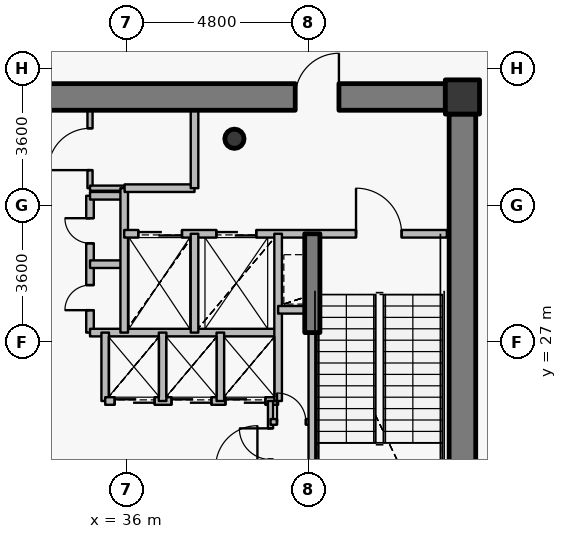
"""IFC4 building model, lengths in metres.
Left out: names, types, materials, properties, quantities, classifications, styles, units other than length and angle.
Written with IfcOpenShell. Run it as: python <this file> out.ifc"""

import sys

from ifc_helpers import new_model, si_unit, direction, frame, frame_2d, origin, origin_2d, place, context, subcontext, project, spatial, rectangle, hollow_circle, extrude, source, transform, mapped, element, fill, save


model = new_model("IFC4")
c1 = context("Model", 3, precision=1e-05, world=origin(), true_north=direction((0.0, 1.0)))
c2 = subcontext(c1, "Body", "Model", "MODEL_VIEW")
j1 = project(units=[si_unit("LENGTHUNIT", "METRE"), si_unit("PLANEANGLEUNIT", "RADIAN")], contexts=[c1])
p1 = place(None, origin())
s1 = spatial("IfcSite", under=j1, at=p1, CompositionType="ELEMENT")
p2 = place(p1, origin())
s2 = spatial("IfcBuilding", under=s1, at=p2, CompositionType="ELEMENT")
p3 = place(p2, frame((0.0, 0.0, 355.2)))
s3 = spatial("IfcBuildingStorey", under=s2, at=p3, CompositionType="ELEMENT", Elevation=355.2)
p4 = place(p3, frame((44.85, 33.45, 0.0), z_axis=(0.0, 0.0, 1.0), x_axis=(1.0, 0.0, 0.0)))
e1 = element("IfcColumn", 1, at=p4, inside=s3, PredefinedType="COLUMN", context=c2, shape_type="SweptSolid", body=[
    extrude(rectangle(XDim=0.9, YDim=0.9, at=origin_2d()), origin(), (0.0, 0.0, 1.0), 4.2),
])
p5 = place(p3, frame((38.85, 32.35, 0.0), z_axis=(0.0, 0.0, 1.0), x_axis=(1.0, 0.0, 0.0)))
e2 = element("IfcColumn", 2, at=p5, inside=s3, PredefinedType="COLUMN", context=c2, shape_type="SweptSolid", body=[
    extrude(hollow_circle(Radius=0.254, WallThickness=0.02, at=origin_2d()), origin(), (0.0, 0.0, 1.0), 4.2),
])
p6 = place(p3, frame((27.6, 33.45, 0.0), z_axis=(0.0, 0.0, 1.0), x_axis=(1.0, 0.0, 0.0)))
e3 = element("IfcWall", 3, at=p6, inside=s3, PredefinedType="SHEAR", context=c2, shape_type="SweptSolid", body=[
    extrude(rectangle(XDim=16.8, YDim=0.7, at=frame_2d((8.4, 0.0))), origin(), (0.0, 0.0, 1.0), 3.5),
])
p7 = place(p6, frame((12.85, 0.0, 0.0)))
e4 = element("IfcOpeningElement", 4, at=p7, cuts=e3, PredefinedType="OPENING", context=c2, shape_type="SweptSolid", body=[
    extrude(rectangle(XDim=1.15, YDim=2.15, at=origin_2d()), frame((0.575, 0.36, 1.075), z_axis=(0.0, -1.0, 0.0), x_axis=(1.0, 0.0, 0.0)), (0.0, 0.0, 1.0), 0.72),
])
p8 = place(p3, frame((44.85, 33.0, 0.0), z_axis=(0.0, 0.0, 1.0), x_axis=(0.0, -1.0, 0.0)))
e5 = element("IfcWall", 5, at=p8, inside=s3, PredefinedType="SHEAR", context=c2, shape_type="SweptSolid", body=[
    extrude(rectangle(XDim=12.0, YDim=0.7, at=frame_2d((6.0, 0.0))), origin(), (0.0, 0.0, 1.0), 3.5),
])
p9 = place(p3, frame((40.9, 27.25, 0.0), z_axis=(0.0, 0.0, 1.0), x_axis=(0.0, 1.0, 0.0)))
e6 = element("IfcWall", 6, at=p9, inside=s3, PredefinedType="SHEAR", context=c2, shape_type="SweptSolid", body=[
    extrude(rectangle(XDim=2.6, YDim=0.4, at=frame_2d((1.3, 0.0))), origin(), (0.0, 0.0, 1.0), 3.55),
])
p10 = place(p3, frame((35.05, 27.25, 0.0), z_axis=(0.0, 0.0, 1.0), x_axis=(0.0, 1.0, 0.0)))
e7 = element("IfcWall", 7, at=p10, inside=s3, PredefinedType="PARTITIONING", context=c2, shape_type="SweptSolid", body=[
    extrude(rectangle(XDim=3.6, YDim=0.2, at=frame_2d((1.8, 0.0))), origin(), (0.0, 0.0, 1.0), 3.95),
])
p11 = place(p10, frame((0.59, 0.0, 0.0)))
e8 = element("IfcOpeningElement", 8, at=p11, cuts=e7, PredefinedType="OPENING", context=c2, shape_type="SweptSolid", body=[
    extrude(rectangle(XDim=0.66, YDim=2.05, at=origin_2d()), frame((0.33, 0.11, 1.025), z_axis=(0.0, -1.0, 0.0), x_axis=(1.0, 0.0, 0.0)), (0.0, 0.0, 1.0), 0.22),
])
p12 = place(p10, frame((2.35, 0.0, 0.0)))
e9 = element("IfcOpeningElement", 9, at=p12, cuts=e7, PredefinedType="OPENING", context=c2, shape_type="SweptSolid", body=[
    extrude(rectangle(XDim=0.66, YDim=2.05, at=origin_2d()), frame((0.33, 0.11, 1.025), z_axis=(0.0, -1.0, 0.0), x_axis=(1.0, 0.0, 0.0)), (0.0, 0.0, 1.0), 0.22),
])
p13 = place(p3, frame((35.05, 27.25, 0.0), z_axis=(0.0, 0.0, 1.0), x_axis=(1.0, 0.0, 0.0)))
e10 = element("IfcWall", 10, at=p13, inside=s3, PredefinedType="PARTITIONING", context=c2, shape_type="SweptSolid", body=[
    extrude(rectangle(XDim=4.95, YDim=0.2, at=frame_2d((2.475, 0.0))), origin(), (0.0, 0.0, 1.0), 3.535),
])
for number, where, z_axis, x_axis in (
    (11, (35.05, 29.05, 0.0), (0.0, 0.0, 1.0), (1.0, 0.0, 0.0)),
    (12, (35.05, 30.85, 0.0), (0.0, 0.0, 1.0), (1.0, 0.0, 0.0)),
):
    element("IfcWall", number, at=place(p3, frame(where, z_axis=z_axis, x_axis=x_axis)), inside=s3, PredefinedType="PARTITIONING", context=c2, shape_type="SweptSolid", body=[
        extrude(rectangle(XDim=0.9, YDim=0.2, at=frame_2d((0.45, 0.0))), origin(), (0.0, 0.0, 1.0), 3.95),
    ])
p14 = place(p3, frame((35.05, 31.05, 0.0), z_axis=(0.0, 0.0, 1.0), x_axis=(0.0, 1.0, 0.0)))
e13 = element("IfcWall", 13, at=p14, inside=s3, PredefinedType="PARTITIONING", context=c2, shape_type="SweptSolid", body=[
    extrude(rectangle(XDim=2.05, YDim=0.135, at=frame_2d((1.025, 0.0))), origin(), (0.0, 0.0, 1.0), 3.535),
])
p15 = place(p14, frame((0.475, 0.0, 0.0)))
e14 = element("IfcOpeningElement", 14, at=p15, cuts=e13, PredefinedType="OPENING", context=c2, shape_type="SweptSolid", body=[
    extrude(rectangle(XDim=1.1, YDim=2.15, at=origin_2d()), frame((0.55, 0.078, 1.075), z_axis=(0.0, -1.0, 0.0), x_axis=(1.0, 0.0, 0.0)), (0.0, 0.0, 1.0), 0.155),
])
p16 = place(p3, frame((35.05, 31.05, 0.0), z_axis=(0.0, 0.0, 1.0), x_axis=(1.0, 0.0, 0.0)))
e15 = element("IfcWall", 15, at=p16, inside=s3, PredefinedType="PARTITIONING", context=c2, shape_type="SweptSolid", body=[
    extrude(rectangle(XDim=0.9, YDim=0.135, at=frame_2d((0.45, 0.0))), origin(), (0.0, 0.0, 1.0), 3.95),
])
p17 = place(p3, frame((35.45, 25.45, 0.0), z_axis=(0.0, 0.0, 1.0), x_axis=(0.0, 1.0, 0.0)))
e16 = element("IfcWall", 16, at=p17, inside=s3, PredefinedType="PARTITIONING", context=c2, shape_type="SweptSolid", body=[
    extrude(rectangle(XDim=1.8, YDim=0.2, at=frame_2d((0.9, 0.0))), origin(), (0.0, 0.0, 1.0), 3.95),
])
p18 = place(p3, frame((35.45, 25.45, 0.0), z_axis=(0.0, 0.0, 1.0), x_axis=(1.0, 0.0, 0.0)))
e17 = element("IfcWall", 17, at=p18, inside=s3, PredefinedType="PARTITIONING", context=c2, shape_type="SweptSolid", body=[
    extrude(rectangle(XDim=4.55, YDim=0.2, at=frame_2d((2.275, 0.0))), origin(), (0.0, 0.0, 1.0), 3.535),
])
p19 = place(p18, frame((0.25, 0.0, 0.0)))
e18 = element("IfcOpeningElement", 18, at=p19, cuts=e17, PredefinedType="OPENING", context=c2, shape_type="SweptSolid", body=[
    extrude(rectangle(XDim=1.05, YDim=2.15, at=origin_2d()), frame((0.525, 0.11, 1.075), z_axis=(0.0, -1.0, 0.0), x_axis=(1.0, 0.0, 0.0)), (0.0, 0.0, 1.0), 0.22),
])
p20 = place(p18, frame((1.745, 0.0, 0.0)))
e19 = element("IfcOpeningElement", 19, at=p20, cuts=e17, PredefinedType="OPENING", context=c2, shape_type="SweptSolid", body=[
    extrude(rectangle(XDim=1.05, YDim=2.15, at=origin_2d()), frame((0.525, 0.11, 1.075), z_axis=(0.0, -1.0, 0.0), x_axis=(1.0, 0.0, 0.0)), (0.0, 0.0, 1.0), 0.22),
])
p21 = place(p18, frame((3.165, 0.0, 0.0)))
e20 = element("IfcOpeningElement", 20, at=p21, cuts=e17, PredefinedType="OPENING", context=c2, shape_type="SweptSolid", body=[
    extrude(rectangle(XDim=1.05, YDim=2.15, at=origin_2d()), frame((0.525, 0.11, 1.075), z_axis=(0.0, -1.0, 0.0), x_axis=(1.0, 0.0, 0.0)), (0.0, 0.0, 1.0), 0.22),
])
p22 = place(p3, frame((35.95, 27.25, 0.0), z_axis=(0.0, 0.0, 1.0), x_axis=(0.0, 1.0, 0.0)))
e21 = element("IfcWall", 21, at=p22, inside=s3, PredefinedType="PARTITIONING", context=c2, shape_type="SweptSolid", body=[
    extrude(rectangle(XDim=3.8, YDim=0.2, at=frame_2d((1.9, 0.0))), origin(), (0.0, 0.0, 1.0), 3.95),
])
p23 = place(p3, frame((35.95, 29.85, 0.0), z_axis=(0.0, 0.0, 1.0), x_axis=(1.0, 0.0, 0.0)))
e22 = element("IfcWall", 22, at=p23, inside=s3, PredefinedType="PARTITIONING", context=c2, shape_type="SweptSolid", body=[
    extrude(rectangle(XDim=8.49, YDim=0.2, at=frame_2d((4.245, 0.0))), origin(), (0.0, 0.0, 1.0), 3.535),
])
p24 = place(p23, frame((6.1, 0.0, 0.0)))
e23 = element("IfcOpeningElement", 23, at=p24, cuts=e22, PredefinedType="OPENING", context=c2, shape_type="SweptSolid", body=[
    extrude(rectangle(XDim=1.2, YDim=2.15, at=origin_2d()), frame((0.6, 0.11, 1.075), z_axis=(0.0, -1.0, 0.0), x_axis=(1.0, 0.0, 0.0)), (0.0, 0.0, 1.0), 0.22),
])
p25 = place(p23, frame((0.37, 0.0, 0.0)))
e24 = element("IfcOpeningElement", 24, at=p25, cuts=e22, PredefinedType="OPENING", context=c2, shape_type="SweptSolid", body=[
    extrude(rectangle(XDim=1.15, YDim=2.15, at=origin_2d()), frame((0.575, 0.11, 1.075), z_axis=(0.0, -1.0, 0.0), x_axis=(1.0, 0.0, 0.0)), (0.0, 0.0, 1.0), 0.22),
])
p26 = place(p23, frame((2.425, 0.0, 0.0)))
e25 = element("IfcOpeningElement", 25, at=p26, cuts=e22, PredefinedType="OPENING", context=c2, shape_type="SweptSolid", body=[
    extrude(rectangle(XDim=1.05, YDim=2.15, at=origin_2d()), frame((0.525, 0.11, 1.075), z_axis=(0.0, -1.0, 0.0), x_axis=(1.0, 0.0, 0.0)), (0.0, 0.0, 1.0), 0.22),
])
p27 = place(p3, frame((35.96, 31.05, 0.0), z_axis=(0.0, 0.0, 1.0), x_axis=(1.0, 0.0, 0.0)))
e26 = element("IfcWall", 26, at=p27, inside=s3, PredefinedType="PARTITIONING", context=c2, shape_type="SweptSolid", body=[
    extrude(rectangle(XDim=1.84, YDim=0.2, at=frame_2d((0.92, 0.0))), origin(), (0.0, 0.0, 1.0), 3.95),
])
p28 = place(p3, frame((36.96, 25.45, 0.0), z_axis=(0.0, 0.0, 1.0), x_axis=(0.0, 1.0, 0.0)))
e27 = element("IfcWall", 27, at=p28, inside=s3, PredefinedType="PARTITIONING", context=c2, shape_type="SweptSolid", body=[
    extrude(rectangle(XDim=1.8, YDim=0.2, at=frame_2d((0.9, 0.0))), origin(), (0.0, 0.0, 1.0), 3.95),
])
p29 = place(p3, frame((37.8, 27.25, 0.0), z_axis=(0.0, 0.0, 1.0), x_axis=(0.0, 1.0, 0.0)))
e28 = element("IfcWall", 28, at=p29, inside=s3, PredefinedType="PARTITIONING", context=c2, shape_type="SweptSolid", body=[
    extrude(rectangle(XDim=2.6, YDim=0.2, at=frame_2d((1.3, 0.0))), origin(), (0.0, 0.0, 1.0), 3.95),
])
p30 = place(p3, frame((37.8, 31.05, 0.0), z_axis=(0.0, 0.0, 1.0), x_axis=(0.0, 1.0, 0.0)))
e29 = element("IfcWall", 29, at=p30, inside=s3, PredefinedType="PARTITIONING", context=c2, shape_type="SweptSolid", body=[
    extrude(rectangle(XDim=2.05, YDim=0.2, at=frame_2d((1.025, 0.0))), origin(), (0.0, 0.0, 1.0), 3.535),
])
p31 = place(p3, frame((38.48, 25.45, 0.0), z_axis=(0.0, 0.0, 1.0), x_axis=(0.0, 1.0, 0.0)))
e30 = element("IfcWall", 30, at=p31, inside=s3, PredefinedType="PARTITIONING", context=c2, shape_type="SweptSolid", body=[
    extrude(rectangle(XDim=1.8, YDim=0.2, at=frame_2d((0.9, 0.0))), origin(), (0.0, 0.0, 1.0), 3.95),
])
p32 = place(p3, frame((39.8, 23.7, 0.0), z_axis=(0.0, 0.0, 1.0), x_axis=(0.0, 1.0, 0.0)))
e31 = element("IfcWall", 31, at=p32, inside=s3, PredefinedType="PARTITIONING", context=c2, shape_type="SweptSolid", body=[
    extrude(rectangle(XDim=1.75, YDim=0.135, at=frame_2d((0.875, 0.0))), origin(), (0.0, 0.0, 1.0), 3.95),
])
p33 = place(p32, frame((0.21, 0.0, 0.0)))
e32 = element("IfcOpeningElement", 32, at=p33, cuts=e31, PredefinedType="OPENING", context=c2, shape_type="SweptSolid", body=[
    extrude(rectangle(XDim=0.82, YDim=2.1, at=origin_2d()), frame((0.41, 0.078, 1.05), z_axis=(0.0, -1.0, 0.0), x_axis=(1.0, 0.0, 0.0)), (0.0, 0.0, 1.0), 0.155),
])
p34 = place(p3, frame((39.8, 24.9, 0.0), z_axis=(0.0, 0.0, 1.0), x_axis=(1.0, 0.0, 0.0)))
e33 = element("IfcWall", 33, at=p34, inside=s3, PredefinedType="PARTITIONING", context=c2, shape_type="SweptSolid", body=[
    extrude(rectangle(XDim=1.1, YDim=0.15, at=frame_2d((0.55, 0.0))), origin(), (0.0, 0.0, 1.0), 3.95),
])
p35 = place(p34, frame((0.17, 0.0, 0.0)))
e34 = element("IfcOpeningElement", 34, at=p35, cuts=e33, PredefinedType="OPENING", context=c2, shape_type="SweptSolid", body=[
    extrude(rectangle(XDim=0.76, YDim=2.1, at=origin_2d()), frame((0.38, 0.085, 1.05), z_axis=(0.0, -1.0, 0.0), x_axis=(1.0, 0.0, 0.0)), (0.0, 0.0, 1.0), 0.17),
])
p36 = place(p3, frame((40.0, 25.45, 0.0), z_axis=(0.0, 0.0, 1.0), x_axis=(0.0, 1.0, 0.0)))
e35 = element("IfcWall", 35, at=p36, inside=s3, PredefinedType="PARTITIONING", context=c2, shape_type="SweptSolid", body=[
    extrude(rectangle(XDim=4.4, YDim=0.2, at=frame_2d((2.2, 0.0))), origin(), (0.0, 0.0, 1.0), 3.95),
])
p37 = place(p3, frame((40.0, 27.85, 0.0), z_axis=(0.0, 0.0, 1.0), x_axis=(1.0, 0.0, 0.0)))
e36 = element("IfcWall", 36, at=p37, inside=s3, PredefinedType="PARTITIONING", context=c2, shape_type="SweptSolid", body=[
    extrude(rectangle(XDim=0.9, YDim=0.2, at=frame_2d((0.45, 0.0))), origin(), (0.0, 0.0, 1.0), 3.95),
])
p38 = place(p3, frame((40.9, 21.33, 0.0), z_axis=(0.0, 0.0, 1.0), x_axis=(0.0, 1.0, 0.0)))
e37 = element("IfcWall", 37, at=p38, inside=s3, PredefinedType="PARTITIONING", context=c2, shape_type="SweptSolid", body=[
    extrude(rectangle(XDim=5.91, YDim=0.2, at=frame_2d((2.955, 0.0))), origin(), (0.0, 0.0, 1.0), 3.485),
])
p39 = place(p3, frame((45.2, 33.8, 0.0), z_axis=(0.0, 0.0, 1.0), x_axis=(-1.0, 0.0, 0.0)))
e38 = element("IfcWall", 38, at=p39, inside=s3, PredefinedType="PARTITIONING", context=c2, shape_type="SweptSolid", body=[
    extrude(rectangle(XDim=0.79, YDim=0.135, at=frame_2d((0.395, 0.0))), origin(), (0.0, 0.0, 1.0), 3.485),
])
p40 = place(p3, frame((45.2, 33.01, 0.0), z_axis=(0.0, 0.0, 1.0), x_axis=(0.0, 1.0, 0.0)))
e39 = element("IfcWall", 39, at=p40, inside=s3, PredefinedType="PARTITIONING", context=c2, shape_type="SweptSolid", body=[
    extrude(rectangle(XDim=0.482, YDim=0.135, at=frame_2d((0.241, 0.0))), origin(), (0.0, 0.0, 1.0), 3.95),
])
m1 = source(origin(), c2, "Body", "SweptSolid", [
    extrude(rectangle(XDim=1.15, YDim=2.15, at=origin_2d()), frame((0.575, 0.025, 1.075), z_axis=(0.0, -1.0, 0.0), x_axis=(1.0, 0.0, 0.0)), (0.0, 0.0, 1.0), 0.05),
])
p41 = place(p7, origin())
e40 = element("IfcDoor", 40, at=p41, inside=s3, OperationType="SINGLE_SWING_RIGHT", PredefinedType="DOOR", context=c2, shape_type="MappedRepresentation", body=[
    mapped(m1, transform((0.0, 0.0, 0.0), x_axis=(1.0, 0.0, 0.0), y_axis=(0.0, 1.0, 0.0), z_axis=(0.0, 0.0, 1.0), scale=1.0)),
])
fill(e4, e40)
m2 = source(origin(), c2, "Body", "SweptSolid", [
    extrude(rectangle(XDim=1.2, YDim=2.15, at=origin_2d()), frame((0.6, 0.025, 1.075), z_axis=(0.0, -1.0, 0.0), x_axis=(1.0, 0.0, 0.0)), (0.0, 0.0, 1.0), 0.05),
])
p42 = place(p24, origin())
e41 = element("IfcDoor", 41, at=p42, inside=s3, OperationType="SINGLE_SWING_LEFT", PredefinedType="DOOR", context=c2, shape_type="MappedRepresentation", body=[
    mapped(m2, transform((0.0, 0.0, 0.0), x_axis=(1.0, 0.0, 0.0), y_axis=(0.0, 1.0, 0.0), z_axis=(0.0, 0.0, 1.0), scale=1.0)),
])
fill(e23, e41)
m3 = source(origin(), c2, "Body", "SweptSolid", [
    extrude(rectangle(XDim=1.15, YDim=2.15, at=origin_2d()), frame((0.575, 0.025, 1.075), z_axis=(0.0, -1.0, 0.0), x_axis=(1.0, 0.0, 0.0)), (0.0, 0.0, 1.0), 0.05),
])
p43 = place(p25, origin())
e42 = element("IfcDoor", 42, at=p43, inside=s3, OperationType="DOUBLE_DOOR_SLIDING", PredefinedType="USERDEFINED", context=c2, shape_type="MappedRepresentation", body=[
    mapped(m3, transform((0.0, 0.0, 0.0), x_axis=(1.0, 0.0, 0.0), y_axis=(0.0, 1.0, 0.0), z_axis=(0.0, 0.0, 1.0), scale=1.0)),
])
fill(e24, e42)
m4 = source(origin(), c2, "Body", "SweptSolid", [
    extrude(rectangle(XDim=1.05, YDim=2.15, at=origin_2d()), frame((0.525, 0.025, 1.075), z_axis=(0.0, -1.0, 0.0), x_axis=(1.0, 0.0, 0.0)), (0.0, 0.0, 1.0), 0.05),
])
p44 = place(p26, origin())
e43 = element("IfcDoor", 43, at=p44, inside=s3, OperationType="DOUBLE_DOOR_SLIDING", PredefinedType="USERDEFINED", context=c2, shape_type="MappedRepresentation", body=[
    mapped(m4, transform((0.0, 0.0, 0.0), x_axis=(1.0, 0.0, 0.0), y_axis=(0.0, 1.0, 0.0), z_axis=(0.0, 0.0, 1.0), scale=1.0)),
])
fill(e25, e43)
p45 = place(p19, origin())
e44 = element("IfcDoor", 44, at=p45, inside=s3, OperationType="DOUBLE_DOOR_SLIDING", PredefinedType="USERDEFINED", context=c2, shape_type="MappedRepresentation", body=[
    mapped(m4, transform((0.0, 0.0, 0.0), x_axis=(1.0, 0.0, 0.0), y_axis=(0.0, 1.0, 0.0), z_axis=(0.0, 0.0, 1.0), scale=1.0)),
])
fill(e18, e44)
p46 = place(p20, origin())
e45 = element("IfcDoor", 45, at=p46, inside=s3, OperationType="DOUBLE_DOOR_SLIDING", PredefinedType="USERDEFINED", context=c2, shape_type="MappedRepresentation", body=[
    mapped(m4, transform((0.0, 0.0, 0.0), x_axis=(1.0, 0.0, 0.0), y_axis=(0.0, 1.0, 0.0), z_axis=(0.0, 0.0, 1.0), scale=1.0)),
])
fill(e19, e45)
p47 = place(p21, origin())
e46 = element("IfcDoor", 46, at=p47, inside=s3, OperationType="DOUBLE_DOOR_SLIDING", PredefinedType="USERDEFINED", context=c2, shape_type="MappedRepresentation", body=[
    mapped(m4, transform((0.0, 0.0, 0.0), x_axis=(1.0, 0.0, 0.0), y_axis=(0.0, 1.0, 0.0), z_axis=(0.0, 0.0, 1.0), scale=1.0)),
])
fill(e20, e46)
m5 = source(origin(), c2, "Body", "SweptSolid", [
    extrude(rectangle(XDim=0.66, YDim=2.05, at=origin_2d()), frame((0.33, 0.025, 1.025), z_axis=(0.0, -1.0, 0.0), x_axis=(1.0, 0.0, 0.0)), (0.0, 0.0, 1.0), 0.05),
])
p48 = place(p11, origin())
e47 = element("IfcDoor", 47, at=p48, inside=s3, OperationType="SINGLE_SWING_LEFT", PredefinedType="USERDEFINED", context=c2, shape_type="MappedRepresentation", body=[
    mapped(m5, transform((0.0, 0.0, 0.0), x_axis=(1.0, 0.0, 0.0), y_axis=(0.0, 1.0, 0.0), z_axis=(0.0, 0.0, 1.0), scale=1.0)),
])
fill(e8, e47)
p49 = place(p12, origin())
e48 = element("IfcDoor", 48, at=p49, inside=s3, OperationType="SINGLE_SWING_RIGHT", PredefinedType="USERDEFINED", context=c2, shape_type="MappedRepresentation", body=[
    mapped(m5, transform((0.0, 0.0, 0.0), x_axis=(1.0, 0.0, 0.0), y_axis=(0.0, 1.0, 0.0), z_axis=(0.0, 0.0, 1.0), scale=1.0)),
])
fill(e9, e48)
m6 = source(origin(), c2, "Body", "SweptSolid", [
    extrude(rectangle(XDim=1.1, YDim=2.15, at=origin_2d()), frame((0.55, 0.025, 1.075), z_axis=(0.0, -1.0, 0.0), x_axis=(1.0, 0.0, 0.0)), (0.0, 0.0, 1.0), 0.05),
])
p50 = place(p15, origin())
e49 = element("IfcDoor", 49, at=p50, inside=s3, OperationType="SINGLE_SWING_LEFT", PredefinedType="DOOR", context=c2, shape_type="MappedRepresentation", body=[
    mapped(m6, transform((0.0, 0.0, 0.0), x_axis=(1.0, 0.0, 0.0), y_axis=(0.0, 1.0, 0.0), z_axis=(0.0, 0.0, 1.0), scale=1.0)),
])
fill(e14, e49)
m7 = source(origin(), c2, "Body", "SweptSolid", [
    extrude(rectangle(XDim=0.82, YDim=2.1, at=origin_2d()), frame((0.41, 0.025, 1.05), z_axis=(0.0, -1.0, 0.0), x_axis=(1.0, 0.0, 0.0)), (0.0, 0.0, 1.0), 0.05),
])
p51 = place(p33, origin())
e50 = element("IfcDoor", 50, at=p51, inside=s3, OperationType="SINGLE_SWING_RIGHT", PredefinedType="DOOR", context=c2, shape_type="MappedRepresentation", body=[
    mapped(m7, transform((0.0, 0.0, 0.0), x_axis=(1.0, 0.0, 0.0), y_axis=(0.0, 1.0, 0.0), z_axis=(0.0, 0.0, 1.0), scale=1.0)),
])
fill(e32, e50)
m8 = source(origin(), c2, "Body", "SweptSolid", [
    extrude(rectangle(XDim=0.76, YDim=2.1, at=origin_2d()), frame((0.38, 0.025, 1.05), z_axis=(0.0, -1.0, 0.0), x_axis=(1.0, 0.0, 0.0)), (0.0, 0.0, 1.0), 0.05),
])
p52 = place(p35, origin())
e51 = element("IfcDoor", 51, at=p52, inside=s3, OperationType="SINGLE_SWING_LEFT", PredefinedType="DOOR", context=c2, shape_type="MappedRepresentation", body=[
    mapped(m8, transform((0.0, 0.0, 0.0), x_axis=(1.0, 0.0, 0.0), y_axis=(0.0, 1.0, 0.0), z_axis=(0.0, 0.0, 1.0), scale=1.0)),
])
fill(e34, e51)
save(model, sys.argv[1])
